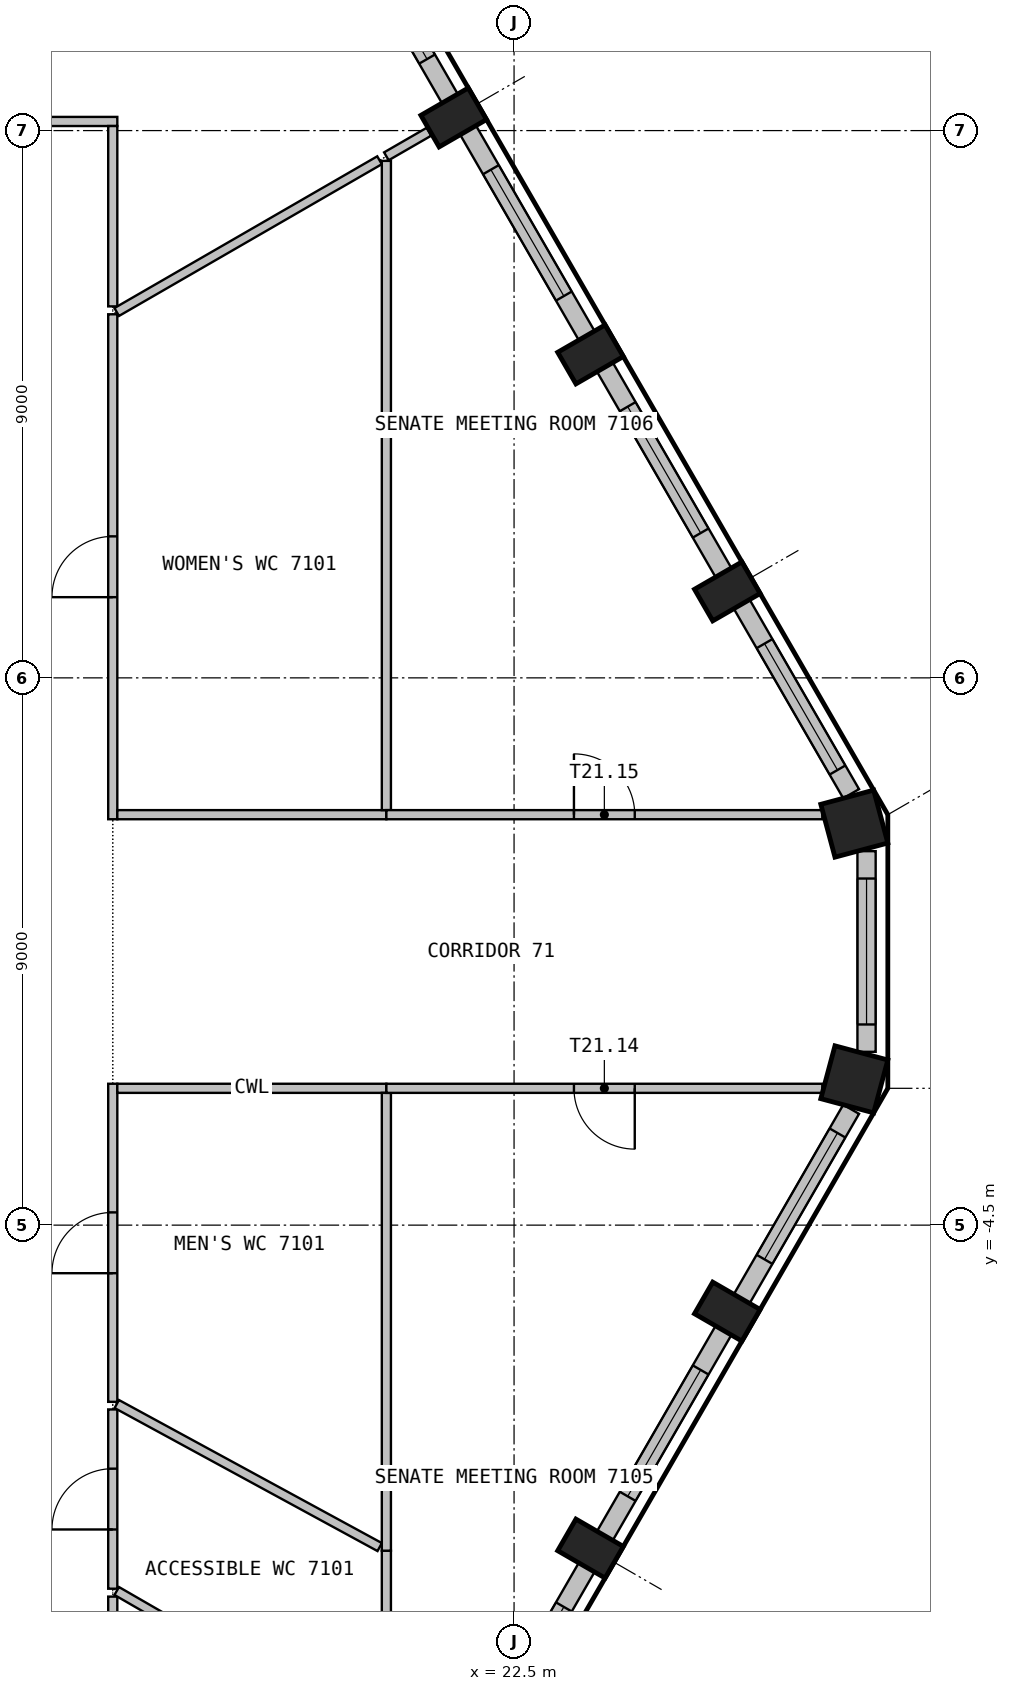
"""IFC4 building model, lengths in metres.
Left out: names, types, materials, properties, quantities, classifications, styles, units other than length and angle.
Written with IfcOpenShell. Run it as: python <this file> out.ifc"""

import sys

from ifc_helpers import new_model, si_unit, direction, frame, frame_2d, origin, origin_2d, place, context, subcontext, project, spatial, rectangle, extrude, element, fill, save


model = new_model("IFC4")
c1 = context("Model", 3, precision=1e-05, world=origin(), true_north=direction((0.0, 1.0)))
c2 = subcontext(c1, "Body", "Model", "MODEL_VIEW")
j1 = project(units=[si_unit("LENGTHUNIT", "METRE"), si_unit("PLANEANGLEUNIT", "RADIAN")], contexts=[c1])
p1 = place(None, origin())
s1 = spatial("IfcSite", under=j1, at=p1, CompositionType="ELEMENT")
p2 = place(p1, origin())
s2 = spatial("IfcBuilding", under=s1, at=p2, CompositionType="ELEMENT")
p3 = place(p2, frame((0.0, 0.0, 286.5)))
s3 = spatial("IfcBuildingStorey", under=s2, at=p3, CompositionType="ELEMENT", Elevation=286.5)
for number, where, z_axis, x_axis in (
    (1, (23.757, -9.819, 0.0), (0.0, 0.0, 1.0), (0.5, 0.866, 0.0)),
    (2, (26.007, -5.922, 0.0), (0.0, 0.0, 1.0), (0.5, 0.866, 0.0)),
):
    element("IfcColumn", number, at=place(p3, frame(where, z_axis=z_axis, x_axis=x_axis)), inside=s3, PredefinedType="COLUMN", context=c2, shape_type="SweptSolid", body=[
        extrude(rectangle(XDim=0.6, YDim=0.9, at=origin_2d()), origin(), (0.0, 0.0, 1.0), 3.575),
    ])
for number, where, z_axis, x_axis in (
    (3, (28.096, -2.102, 0.0), (0.0, 0.0, 1.0), (0.259, 0.966, 0.0)),
    (4, (28.096, 2.102, 0.0), (0.0, 0.0, 1.0), (-0.259, 0.966, 0.0)),
):
    element("IfcColumn", number, at=place(p3, frame(where, z_axis=z_axis, x_axis=x_axis)), inside=s3, PredefinedType="COLUMN", context=c2, shape_type="SweptSolid", body=[
        extrude(rectangle(XDim=0.9, YDim=0.9, at=origin_2d()), origin(), (0.0, 0.0, 1.0), 3.575),
    ])
for number, where, z_axis, x_axis in (
    (5, (26.007, 5.922, 0.0), (0.0, 0.0, 1.0), (-0.5, 0.866, 0.0)),
    (6, (23.757, 9.819, 0.0), (0.0, 0.0, 1.0), (-0.5, 0.866, 0.0)),
    (7, (21.507, 13.716, 0.0), (0.0, 0.0, 1.0), (-0.5, 0.866, 0.0)),
):
    element("IfcColumn", number, at=place(p3, frame(where, z_axis=z_axis, x_axis=x_axis)), inside=s3, PredefinedType="COLUMN", context=c2, shape_type="SweptSolid", body=[
        extrude(rectangle(XDim=0.6, YDim=0.9, at=origin_2d()), origin(), (0.0, 0.0, 1.0), 3.575),
    ])
p4 = place(p3, frame((21.744, -13.506, 0.0), z_axis=(0.0, 0.0, 1.0), x_axis=(0.499984428715, 0.866034393683, 0.0)))
e8 = element("IfcWall", 8, at=p4, inside=s3, PredefinedType="SOLIDWALL", context=c2, shape_type="SweptSolid", body=[
    extrude(rectangle(XDim=3.899, YDim=0.3, at=frame_2d((1.949, 0.0))), origin(), (0.0, 0.0, 1.0), 3.575),
])
p5 = place(p4, frame((0.75, 0.0, 0.9)))
e9 = element("IfcOpeningElement", 9, at=p5, cuts=e8, PredefinedType="OPENING", context=c2, shape_type="SweptSolid", body=[
    extrude(rectangle(XDim=2.4, YDim=2.1, at=frame_2d((1.2, 1.05))), frame((0.0, 0.16, 0.0), z_axis=(0.0, -1.0, 0.0), x_axis=(1.0, 0.0, 0.0)), (0.0, 0.0, 1.0), 0.32),
])
p6 = place(p3, frame((23.994, -9.609, 0.0), z_axis=(0.0, 0.0, 1.0), x_axis=(0.500011542666, 0.866018739521, 0.0)))
e10 = element("IfcWall", 10, at=p6, inside=s3, PredefinedType="SOLIDWALL", context=c2, shape_type="SweptSolid", body=[
    extrude(rectangle(XDim=3.899, YDim=0.3, at=frame_2d((1.949, 0.0))), origin(), (0.0, 0.0, 1.0), 3.575),
])
p7 = place(p6, frame((0.75, 0.0, 0.9)))
e11 = element("IfcOpeningElement", 11, at=p7, cuts=e10, PredefinedType="OPENING", context=c2, shape_type="SweptSolid", body=[
    extrude(rectangle(XDim=2.4, YDim=2.1, at=frame_2d((1.2, 1.05))), frame((0.0, 0.16, 0.0), z_axis=(0.0, -1.0, 0.0), x_axis=(1.0, 0.0, 0.0)), (0.0, 0.0, 1.0), 0.32),
])
p8 = place(p3, frame((26.244, -5.712, 0.0), z_axis=(0.0, 0.0, 1.0), x_axis=(0.499969057507, 0.866043267704, 0.0)))
e12 = element("IfcWall", 12, at=p8, inside=s3, PredefinedType="SOLIDWALL", context=c2, shape_type="SweptSolid", body=[
    extrude(rectangle(XDim=3.599, YDim=0.3, at=frame_2d((1.8, 0.0))), origin(), (0.0, 0.0, 1.0), 3.575),
])
p9 = place(p8, frame((0.75, 0.0, 0.9)))
e13 = element("IfcOpeningElement", 13, at=p9, cuts=e12, PredefinedType="OPENING", context=c2, shape_type="SweptSolid", body=[
    extrude(rectangle(XDim=2.4, YDim=2.1, at=frame_2d((1.2, 1.05))), frame((0.0, 0.16, 0.0), z_axis=(0.0, -1.0, 0.0), x_axis=(1.0, 0.0, 0.0)), (0.0, 0.0, 1.0), 0.32),
])
p10 = place(p3, frame((28.297, -1.65, 0.0), z_axis=(0.0, 0.0, 1.0), x_axis=(0.0, 1.0, 0.0)))
e14 = element("IfcWall", 14, at=p10, inside=s3, PredefinedType="SOLIDWALL", context=c2, shape_type="SweptSolid", body=[
    extrude(rectangle(XDim=3.3, YDim=0.3, at=frame_2d((1.65, 0.0))), origin(), (0.0, 0.0, 1.0), 3.575),
])
p11 = place(p10, frame((0.45, 0.0, 0.9)))
e15 = element("IfcOpeningElement", 15, at=p11, cuts=e14, PredefinedType="OPENING", context=c2, shape_type="SweptSolid", body=[
    extrude(rectangle(XDim=2.4, YDim=2.1, at=frame_2d((1.2, 1.05))), frame((0.0, 0.16, 0.0), z_axis=(0.0, -1.0, 0.0), x_axis=(1.0, 0.0, 0.0)), (0.0, 0.0, 1.0), 0.32),
])
p12 = place(p3, frame((28.044, 2.595, 0.0), z_axis=(0.0, 0.0, 1.0), x_axis=(-0.499969057507, 0.866043267704, 0.0)))
e16 = element("IfcWall", 16, at=p12, inside=s3, PredefinedType="SOLIDWALL", context=c2, shape_type="SweptSolid", body=[
    extrude(rectangle(XDim=3.599, YDim=0.3, at=frame_2d((1.8, 0.0))), origin(), (0.0, 0.0, 1.0), 3.575),
])
p13 = place(p12, frame((0.45, 0.0, 0.9)))
e17 = element("IfcOpeningElement", 17, at=p13, cuts=e16, PredefinedType="OPENING", context=c2, shape_type="SweptSolid", body=[
    extrude(rectangle(XDim=2.4, YDim=2.1, at=frame_2d((1.2, 1.05))), frame((0.0, 0.16, 0.0), z_axis=(0.0, -1.0, 0.0), x_axis=(1.0, 0.0, 0.0)), (0.0, 0.0, 1.0), 0.32),
])
p14 = place(p3, frame((25.944, 6.232, 0.0), z_axis=(0.0, 0.0, 1.0), x_axis=(-0.500011542666, 0.866018739521, 0.0)))
e18 = element("IfcWall", 18, at=p14, inside=s3, PredefinedType="SOLIDWALL", context=c2, shape_type="SweptSolid", body=[
    extrude(rectangle(XDim=3.899, YDim=0.3, at=frame_2d((1.949, 0.0))), origin(), (0.0, 0.0, 1.0), 3.575),
])
p15 = place(p14, frame((0.75, 0.0, 0.9)))
e19 = element("IfcOpeningElement", 19, at=p15, cuts=e18, PredefinedType="OPENING", context=c2, shape_type="SweptSolid", body=[
    extrude(rectangle(XDim=2.4, YDim=2.1, at=frame_2d((1.2, 1.05))), frame((0.0, 0.16, 0.0), z_axis=(0.0, -1.0, 0.0), x_axis=(1.0, 0.0, 0.0)), (0.0, 0.0, 1.0), 0.32),
])
p16 = place(p3, frame((23.694, 10.129, 0.0), z_axis=(0.0, 0.0, 1.0), x_axis=(-0.499984428715, 0.866034393683, 0.0)))
e20 = element("IfcWall", 20, at=p16, inside=s3, PredefinedType="SOLIDWALL", context=c2, shape_type="SweptSolid", body=[
    extrude(rectangle(XDim=3.899, YDim=0.3, at=frame_2d((1.949, 0.0))), origin(), (0.0, 0.0, 1.0), 3.575),
])
p17 = place(p16, frame((0.75, 0.0, 0.9)))
e21 = element("IfcOpeningElement", 21, at=p17, cuts=e20, PredefinedType="OPENING", context=c2, shape_type="SweptSolid", body=[
    extrude(rectangle(XDim=2.4, YDim=2.1, at=frame_2d((1.2, 1.05))), frame((0.0, 0.16, 0.0), z_axis=(0.0, -1.0, 0.0), x_axis=(1.0, 0.0, 0.0)), (0.0, 0.0, 1.0), 0.32),
])
p18 = place(p3, frame((21.444, 14.027, 0.0), z_axis=(0.0, 0.0, 1.0), x_axis=(-0.50001992892, 0.866013897511, 0.0)))
e22 = element("IfcWall", 22, at=p18, inside=s3, PredefinedType="SOLIDWALL", context=c2, shape_type="SweptSolid", body=[
    extrude(rectangle(XDim=3.599, YDim=0.3, at=frame_2d((1.8, 0.0))), origin(), (0.0, 0.0, 1.0), 3.575),
])
p19 = place(p18, frame((0.75, 0.0, 0.9)))
e23 = element("IfcOpeningElement", 23, at=p19, cuts=e22, PredefinedType="OPENING", context=c2, shape_type="SweptSolid", body=[
    extrude(rectangle(XDim=2.4, YDim=2.1, at=frame_2d((1.2, 1.05))), frame((0.0, 0.16, 0.0), z_axis=(0.0, -1.0, 0.0), x_axis=(1.0, 0.0, 0.0)), (0.0, 0.0, 1.0), 0.32),
])
p20 = place(p3, frame((15.975, 13.65, 0.0), z_axis=(0.0, 0.0, 1.0), x_axis=(-1.0, 0.0, 0.0)))
e24 = element("IfcWall", 24, at=p20, inside=s3, PredefinedType="PARTITIONING", context=c2, shape_type="SweptSolid", body=[
    extrude(rectangle(XDim=4.725, YDim=0.15, at=frame_2d((2.363, 0.0))), origin(), (0.0, 0.0, 1.0), 3.575),
])
p21 = place(p20, frame((1.863, 0.0, 0.0)))
e25 = element("IfcOpeningElement", 25, at=p21, cuts=e24, PredefinedType="OPENING", context=c2, shape_type="SweptSolid", body=[
    extrude(rectangle(XDim=1.0, YDim=2.1, at=frame_2d((0.5, 1.05))), frame((0.0, 0.085, 0.0), z_axis=(0.0, -1.0, 0.0), x_axis=(1.0, 0.0, 0.0)), (0.0, 0.0, 1.0), 0.17),
])
p22 = place(p3, frame((15.9, -13.575, 0.0), z_axis=(0.0, 0.0, 1.0), x_axis=(0.0, 1.0, 0.0)))
e26 = element("IfcWall", 26, at=p22, inside=s3, PredefinedType="PARTITIONING", context=c2, shape_type="SweptSolid", body=[
    extrude(rectangle(XDim=2.966, YDim=0.15, at=frame_2d((1.483, 0.0))), origin(), (0.0, 0.0, 1.0), 3.575),
])
p23 = place(p3, frame((15.9, -10.479, 0.0), z_axis=(0.0, 0.0, 1.0), x_axis=(0.0, 1.0, 0.0)))
e27 = element("IfcWall", 27, at=p23, inside=s3, PredefinedType="PARTITIONING", context=c2, shape_type="SweptSolid", body=[
    extrude(rectangle(XDim=2.948, YDim=0.15, at=frame_2d((1.474, 0.0))), origin(), (0.0, 0.0, 1.0), 3.575),
])
p24 = place(p23, frame((0.974, 0.0, 0.0)))
e28 = element("IfcOpeningElement", 28, at=p24, cuts=e27, PredefinedType="OPENING", context=c2, shape_type="SweptSolid", body=[
    extrude(rectangle(XDim=1.0, YDim=2.1, at=frame_2d((0.5, 1.05))), frame((0.0, 0.085, 0.0), z_axis=(0.0, -1.0, 0.0), x_axis=(1.0, 0.0, 0.0)), (0.0, 0.0, 1.0), 0.17),
])
p25 = place(p3, frame((15.965, -10.517, 0.0), z_axis=(0.0, 0.0, 1.0), x_axis=(0.866037122116, -0.499979702705, 0.0)))
e29 = element("IfcWall", 29, at=p25, inside=s3, PredefinedType="PARTITIONING", context=c2, shape_type="SweptSolid", body=[
    extrude(rectangle(XDim=5.121, YDim=0.15, at=frame_2d((2.561, 0.0))), origin(), (0.0, 0.0, 1.0), 3.575),
])
p26 = place(p3, frame((15.9, -7.406, 0.0), z_axis=(0.0, 0.0, 1.0), x_axis=(0.0, 1.0, 0.0)))
e30 = element("IfcWall", 30, at=p26, inside=s3, PredefinedType="PARTITIONING", context=c2, shape_type="SweptSolid", body=[
    extrude(rectangle(XDim=5.231, YDim=0.15, at=frame_2d((2.615, 0.0))), origin(), (0.0, 0.0, 1.0), 3.575),
])
p27 = place(p26, frame((2.115, 0.0, 0.0)))
e31 = element("IfcOpeningElement", 31, at=p27, cuts=e30, PredefinedType="OPENING", context=c2, shape_type="SweptSolid", body=[
    extrude(rectangle(XDim=1.0, YDim=2.1, at=frame_2d((0.5, 1.05))), frame((0.0, 0.085, 0.0), z_axis=(0.0, -1.0, 0.0), x_axis=(1.0, 0.0, 0.0)), (0.0, 0.0, 1.0), 0.17),
])
p28 = place(p3, frame((15.966, -7.442, 0.0), z_axis=(0.0, 0.0, 1.0), x_axis=(0.87845030383, -0.47783371972, 0.0)))
e32 = element("IfcWall", 32, at=p28, inside=s3, PredefinedType="PARTITIONING", context=c2, shape_type="SweptSolid", body=[
    extrude(rectangle(XDim=4.923, YDim=0.15, at=frame_2d((2.461, 0.0))), origin(), (0.0, 0.0, 1.0), 3.575),
])
p29 = place(p3, frame((20.4, -2.25, 0.0), z_axis=(0.0, 0.0, 1.0), x_axis=(-1.0, 0.0, 0.0)))
e33 = element("IfcWall", 33, at=p29, inside=s3, PredefinedType="PARTITIONING", context=c2, shape_type="SweptSolid", body=[
    extrude(rectangle(XDim=4.425, YDim=0.15, at=frame_2d((2.212, 0.0))), origin(), (0.0, 0.0, 1.0), 3.575),
])
p30 = place(p3, frame((15.9, 2.175, 0.0), z_axis=(0.0, 0.0, 1.0), x_axis=(0.0, 1.0, 0.0)))
e34 = element("IfcWall", 34, at=p30, inside=s3, PredefinedType="PARTITIONING", context=c2, shape_type="SweptSolid", body=[
    extrude(rectangle(XDim=8.304, YDim=0.15, at=frame_2d((4.152, 0.0))), origin(), (0.0, 0.0, 1.0), 3.575),
])
p31 = place(p30, frame((3.652, 0.0, 0.0)))
e35 = element("IfcOpeningElement", 35, at=p31, cuts=e34, PredefinedType="OPENING", context=c2, shape_type="SweptSolid", body=[
    extrude(rectangle(XDim=1.0, YDim=2.1, at=frame_2d((0.5, 1.05))), frame((0.0, 0.085, 0.0), z_axis=(0.0, -1.0, 0.0), x_axis=(1.0, 0.0, 0.0)), (0.0, 0.0, 1.0), 0.17),
])
p32 = place(p3, frame((15.975, 2.25, 0.0), z_axis=(0.0, 0.0, 1.0), x_axis=(1.0, 0.0, 0.0)))
e36 = element("IfcWall", 36, at=p32, inside=s3, PredefinedType="PARTITIONING", context=c2, shape_type="SweptSolid", body=[
    extrude(rectangle(XDim=4.425, YDim=0.15, at=frame_2d((2.212, 0.0))), origin(), (0.0, 0.0, 1.0), 3.575),
])
p33 = place(p3, frame((15.9, 10.609, 0.0), z_axis=(0.0, 0.0, 1.0), x_axis=(0.0, 1.0, 0.0)))
e37 = element("IfcWall", 37, at=p33, inside=s3, PredefinedType="PARTITIONING", context=c2, shape_type="SweptSolid", body=[
    extrude(rectangle(XDim=2.966, YDim=0.15, at=frame_2d((1.483, 0.0))), origin(), (0.0, 0.0, 1.0), 3.575),
])
p34 = place(p3, frame((20.287, 13.012, 0.0), z_axis=(0.0, 0.0, 1.0), x_axis=(-0.866034070548, -0.499984988425, 0.0)))
e38 = element("IfcWall", 38, at=p34, inside=s3, PredefinedType="PARTITIONING", context=c2, shape_type="SweptSolid", body=[
    extrude(rectangle(XDim=4.991, YDim=0.15, at=frame_2d((2.496, 0.0))), origin(), (0.0, 0.0, 1.0), 3.575),
])
p35 = place(p3, frame((20.4, -9.854, 0.0), z_axis=(0.0, 0.0, 1.0), x_axis=(0.0, -1.0, 0.0)))
e39 = element("IfcWall", 39, at=p35, inside=s3, PredefinedType="PARTITIONING", context=c2, shape_type="SweptSolid", body=[
    extrude(rectangle(XDim=3.093, YDim=0.15, at=frame_2d((1.546, 0.0))), origin(), (0.0, 0.0, 1.0), 3.575),
])
p36 = place(p3, frame((20.4, -2.325, 0.0), z_axis=(0.0, 0.0, 1.0), x_axis=(0.0, -1.0, 0.0)))
e40 = element("IfcWall", 40, at=p36, inside=s3, PredefinedType="PARTITIONING", context=c2, shape_type="SweptSolid", body=[
    extrude(rectangle(XDim=7.529, YDim=0.15, at=frame_2d((3.765, 0.0))), origin(), (0.0, 0.0, 1.0), 3.575),
])
p37 = place(p3, frame((27.57, -2.25, 0.0), z_axis=(0.0, 0.0, 1.0), x_axis=(-1.0, 0.0, 0.0)))
e41 = element("IfcWall", 41, at=p37, inside=s3, PredefinedType="PARTITIONING", context=c2, shape_type="SweptSolid", body=[
    extrude(rectangle(XDim=7.17, YDim=0.15, at=frame_2d((3.585, 0.0))), origin(), (0.0, 0.0, 1.0), 3.575),
])
p38 = place(p37, frame((3.085, 0.0, 0.0)))
e42 = element("IfcOpeningElement", 42, at=p38, cuts=e41, PredefinedType="OPENING", context=c2, shape_type="SweptSolid", body=[
    extrude(rectangle(XDim=1.0, YDim=2.1, at=frame_2d((0.5, 1.05))), frame((0.0, 0.085, 0.0), z_axis=(0.0, -1.0, 0.0), x_axis=(1.0, 0.0, 0.0)), (0.0, 0.0, 1.0), 0.17),
])
p39 = place(p3, frame((20.4, 13.002, 0.0), z_axis=(0.0, 0.0, 1.0), x_axis=(0.0, -1.0, 0.0)))
e43 = element("IfcWall", 43, at=p39, inside=s3, PredefinedType="PARTITIONING", context=c2, shape_type="SweptSolid", body=[
    extrude(rectangle(XDim=10.677, YDim=0.15, at=frame_2d((5.338, 0.0))), origin(), (0.0, 0.0, 1.0), 3.575),
])
p40 = place(p3, frame((20.4, 2.25, 0.0), z_axis=(0.0, 0.0, 1.0), x_axis=(1.0, 0.0, 0.0)))
e44 = element("IfcWall", 44, at=p40, inside=s3, PredefinedType="PARTITIONING", context=c2, shape_type="SweptSolid", body=[
    extrude(rectangle(XDim=7.17, YDim=0.15, at=frame_2d((3.585, 0.0))), origin(), (0.0, 0.0, 1.0), 3.575),
])
p41 = place(p40, frame((3.085, 0.0, 0.0)))
e45 = element("IfcOpeningElement", 45, at=p41, cuts=e44, PredefinedType="OPENING", context=c2, shape_type="SweptSolid", body=[
    extrude(rectangle(XDim=1.0, YDim=2.1, at=frame_2d((0.5, 1.05))), frame((0.0, 0.085, 0.0), z_axis=(0.0, -1.0, 0.0), x_axis=(1.0, 0.0, 0.0)), (0.0, 0.0, 1.0), 0.17),
])
p42 = place(p3, frame((21.1, 13.481, 0.0), z_axis=(0.0, 0.0, 1.0), x_axis=(-0.866080027667, -0.499905376722, 0.0)))
e46 = element("IfcWall", 46, at=p42, inside=s3, PredefinedType="PARTITIONING", context=c2, shape_type="SweptSolid", body=[
    extrude(rectangle(XDim=0.809, YDim=0.15, at=frame_2d((0.404, 0.0))), origin(), (0.0, 0.0, 1.0), 3.575),
])
p43 = place(p5, origin())
e47 = element("IfcWindow", 47, at=p43, inside=s3, PartitioningType="SINGLE_PANEL", PredefinedType="WINDOW", context=c2, shape_type="SweptSolid", body=[
    extrude(rectangle(XDim=2.4, YDim=2.1, at=frame_2d((1.2, 1.05))), frame((0.0, 0.03, 0.0), z_axis=(0.0, -1.0, 0.0), x_axis=(1.0, 0.0, 0.0)), (0.0, 0.0, 1.0), 0.06),
])
fill(e9, e47)
p44 = place(p7, origin())
e48 = element("IfcWindow", 48, at=p44, inside=s3, PartitioningType="SINGLE_PANEL", PredefinedType="WINDOW", context=c2, shape_type="SweptSolid", body=[
    extrude(rectangle(XDim=2.4, YDim=2.1, at=frame_2d((1.2, 1.05))), frame((0.0, 0.03, 0.0), z_axis=(0.0, -1.0, 0.0), x_axis=(1.0, 0.0, 0.0)), (0.0, 0.0, 1.0), 0.06),
])
fill(e11, e48)
p45 = place(p9, origin())
e49 = element("IfcWindow", 49, at=p45, inside=s3, PartitioningType="SINGLE_PANEL", PredefinedType="WINDOW", context=c2, shape_type="SweptSolid", body=[
    extrude(rectangle(XDim=2.4, YDim=2.1, at=frame_2d((1.2, 1.05))), frame((0.0, 0.03, 0.0), z_axis=(0.0, -1.0, 0.0), x_axis=(1.0, 0.0, 0.0)), (0.0, 0.0, 1.0), 0.06),
])
fill(e13, e49)
p46 = place(p11, origin())
e50 = element("IfcWindow", 50, at=p46, inside=s3, PartitioningType="SINGLE_PANEL", PredefinedType="WINDOW", context=c2, shape_type="SweptSolid", body=[
    extrude(rectangle(XDim=2.4, YDim=2.1, at=frame_2d((1.2, 1.05))), frame((0.0, 0.03, 0.0), z_axis=(0.0, -1.0, 0.0), x_axis=(1.0, 0.0, 0.0)), (0.0, 0.0, 1.0), 0.06),
])
fill(e15, e50)
p47 = place(p13, origin())
e51 = element("IfcWindow", 51, at=p47, inside=s3, PartitioningType="SINGLE_PANEL", PredefinedType="WINDOW", context=c2, shape_type="SweptSolid", body=[
    extrude(rectangle(XDim=2.4, YDim=2.1, at=frame_2d((1.2, 1.05))), frame((0.0, 0.03, 0.0), z_axis=(0.0, -1.0, 0.0), x_axis=(1.0, 0.0, 0.0)), (0.0, 0.0, 1.0), 0.06),
])
fill(e17, e51)
p48 = place(p15, origin())
e52 = element("IfcWindow", 52, at=p48, inside=s3, PartitioningType="SINGLE_PANEL", PredefinedType="WINDOW", context=c2, shape_type="SweptSolid", body=[
    extrude(rectangle(XDim=2.4, YDim=2.1, at=frame_2d((1.2, 1.05))), frame((0.0, 0.03, 0.0), z_axis=(0.0, -1.0, 0.0), x_axis=(1.0, 0.0, 0.0)), (0.0, 0.0, 1.0), 0.06),
])
fill(e19, e52)
p49 = place(p17, origin())
e53 = element("IfcWindow", 53, at=p49, inside=s3, PartitioningType="SINGLE_PANEL", PredefinedType="WINDOW", context=c2, shape_type="SweptSolid", body=[
    extrude(rectangle(XDim=2.4, YDim=2.1, at=frame_2d((1.2, 1.05))), frame((0.0, 0.03, 0.0), z_axis=(0.0, -1.0, 0.0), x_axis=(1.0, 0.0, 0.0)), (0.0, 0.0, 1.0), 0.06),
])
fill(e21, e53)
p50 = place(p19, origin())
e54 = element("IfcWindow", 54, at=p50, inside=s3, PartitioningType="SINGLE_PANEL", PredefinedType="WINDOW", context=c2, shape_type="SweptSolid", body=[
    extrude(rectangle(XDim=2.4, YDim=2.1, at=frame_2d((1.2, 1.05))), frame((0.0, 0.03, 0.0), z_axis=(0.0, -1.0, 0.0), x_axis=(1.0, 0.0, 0.0)), (0.0, 0.0, 1.0), 0.06),
])
fill(e23, e54)
p51 = place(p24, origin())
e55 = element("IfcDoor", 55, at=p51, inside=s3, OperationType="SINGLE_SWING_LEFT", PredefinedType="DOOR", context=c2, shape_type="SweptSolid", body=[
    extrude(rectangle(XDim=1.0, YDim=2.1, at=frame_2d((0.5, 1.05))), frame((0.0, 0.025, 0.0), z_axis=(0.0, -1.0, 0.0), x_axis=(1.0, 0.0, 0.0)), (0.0, 0.0, 1.0), 0.05),
])
fill(e28, e55)
p52 = place(p31, origin())
e56 = element("IfcDoor", 56, at=p52, inside=s3, OperationType="SINGLE_SWING_RIGHT", PredefinedType="DOOR", context=c2, shape_type="SweptSolid", body=[
    extrude(rectangle(XDim=1.0, YDim=2.1, at=frame_2d((0.5, 1.05))), frame((0.0, 0.025, 0.0), z_axis=(0.0, -1.0, 0.0), x_axis=(1.0, 0.0, 0.0)), (0.0, 0.0, 1.0), 0.05),
])
fill(e35, e56)
p53 = place(p27, origin())
e57 = element("IfcDoor", 57, at=p53, inside=s3, OperationType="SINGLE_SWING_RIGHT", PredefinedType="DOOR", context=c2, shape_type="SweptSolid", body=[
    extrude(rectangle(XDim=1.0, YDim=2.1, at=frame_2d((0.5, 1.05))), frame((0.0, 0.025, 0.0), z_axis=(0.0, -1.0, 0.0), x_axis=(1.0, 0.0, 0.0)), (0.0, 0.0, 1.0), 0.05),
])
fill(e31, e57)
p54 = place(p38, origin())
e58 = element("IfcDoor", 58, at=p54, inside=s3, OperationType="SINGLE_SWING_LEFT", PredefinedType="DOOR", context=c2, shape_type="SweptSolid", body=[
    extrude(rectangle(XDim=1.0, YDim=2.1, at=frame_2d((0.5, 1.05))), frame((0.0, 0.025, 0.0), z_axis=(0.0, -1.0, 0.0), x_axis=(1.0, 0.0, 0.0)), (0.0, 0.0, 1.0), 0.05),
])
fill(e42, e58)
p55 = place(p41, origin())
e59 = element("IfcDoor", 59, at=p55, inside=s3, OperationType="SINGLE_SWING_RIGHT", PredefinedType="DOOR", context=c2, shape_type="SweptSolid", body=[
    extrude(rectangle(XDim=1.0, YDim=2.1, at=frame_2d((0.5, 1.05))), frame((0.0, 0.025, 0.0), z_axis=(0.0, -1.0, 0.0), x_axis=(1.0, 0.0, 0.0)), (0.0, 0.0, 1.0), 0.05),
])
fill(e45, e59)
save(model, sys.argv[1])
